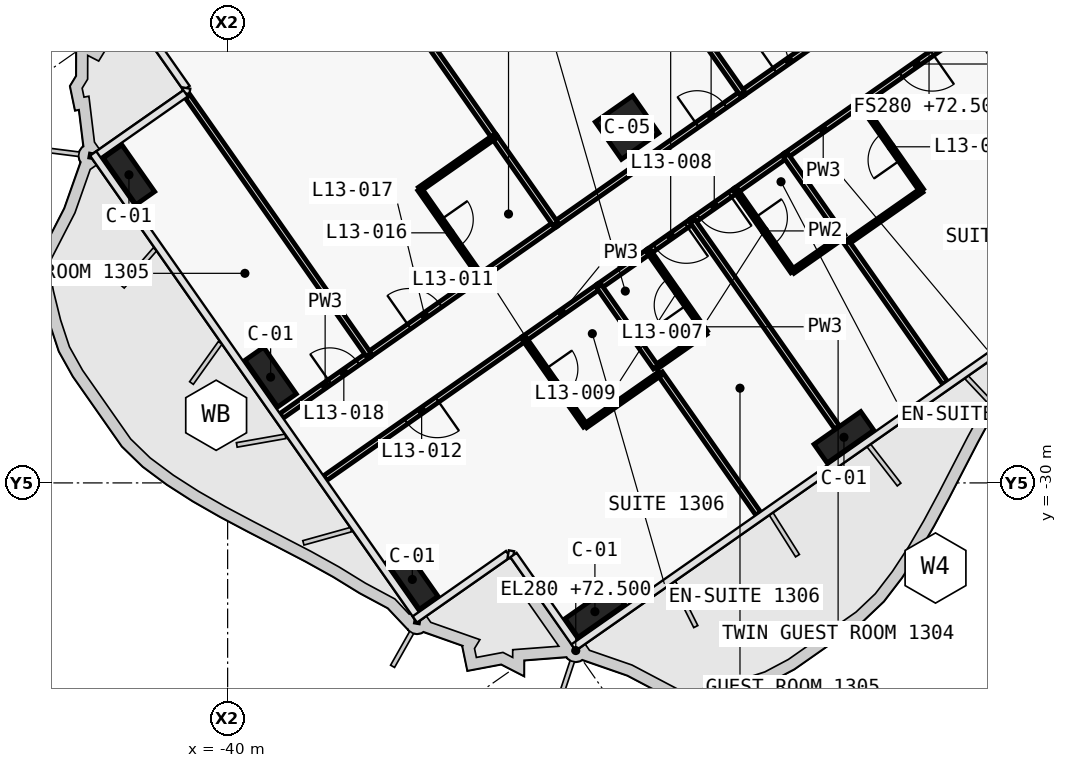
"""IFC4 building model, lengths in metres.
Left out: names, types, materials, properties, quantities, classifications, styles, units other than length and angle.
Written with IfcOpenShell. Run it as: python <this file> out.ifc"""

import sys

from ifc_helpers import new_model, si_unit, direction, frame, frame_2d, origin, origin_2d, place, context, subcontext, project, spatial, rectangle, extrude, element, fill, save


model = new_model("IFC4")
c1 = context("Model", 3, precision=1e-05, world=origin(), true_north=direction((0.0, 1.0)))
c2 = subcontext(c1, "Body", "Model", "MODEL_VIEW")
j1 = project(units=[si_unit("LENGTHUNIT", "METRE"), si_unit("PLANEANGLEUNIT", "RADIAN")], contexts=[c1])
p1 = place(None, origin())
s1 = spatial("IfcSite", under=j1, at=p1, CompositionType="ELEMENT")
p2 = place(p1, origin())
s2 = spatial("IfcBuilding", under=s1, at=p2, CompositionType="ELEMENT")
p3 = place(p2, frame((0.0, 0.0, 72.5)))
s3 = spatial("IfcBuildingStorey", under=s2, at=p3, CompositionType="ELEMENT", Elevation=72.5)
for number, where, z_axis, x_axis in (
    (1, (-23.782, -28.799, 0.0), (0.0, 0.0, 1.0), (-0.819, -0.574, 0.0)),
    (2, (-30.336, -33.388, 0.0), (0.0, 0.0, 1.0), (-0.819, -0.574, 0.0)),
    (3, (-35.14, -32.541, 0.0), (0.0, 0.0, 1.0), (-0.574, 0.819, 0.0)),
    (4, (-38.869, -27.216, 0.0), (0.0, 0.0, 1.0), (-0.574, 0.819, 0.0)),
    (5, (-42.597, -21.892, 0.0), (0.0, 0.0, 1.0), (-0.574, 0.819, 0.0)),
):
    element("IfcColumn", number, at=place(p3, frame(where, z_axis=z_axis, x_axis=x_axis)), inside=s3, PredefinedType="COLUMN", context=c2, shape_type="SweptSolid", body=[
        extrude(rectangle(XDim=1.5, YDim=0.6, at=origin_2d()), origin(), (0.0, 0.0, 1.0), 3.6),
    ])
p4 = place(p3, frame((-29.49, -20.649, 0.0), z_axis=(0.0, 0.0, 1.0), x_axis=(-0.819152044289, -0.573576436351, 0.0)))
e6 = element("IfcColumn", 6, at=p4, inside=s3, PredefinedType="COLUMN", context=c2, shape_type="SweptSolid", body=[
    extrude(rectangle(XDim=1.2, YDim=1.2, at=origin_2d()), origin(), (0.0, 0.0, 1.0), 3.6),
])
p5 = place(p3, frame((-26.46, -19.748, 0.0), z_axis=(0.0, 0.0, 1.0), x_axis=(0.819193738533, 0.573516886193, 0.0)))
e7 = element("IfcWall", 7, at=p5, inside=s3, PredefinedType="PARTITIONING", context=c2, shape_type="SweptSolid", body=[
    extrude(rectangle(XDim=3.004, YDim=0.15, at=frame_2d((1.502, 0.0))), origin(), (0.0, 0.0, 1.0), 3.32),
])
p6 = place(p5, frame((1.052, 0.0, 0.0)))
e8 = element("IfcOpeningElement", 8, at=p6, cuts=e7, PredefinedType="OPENING", context=c2, shape_type="SweptSolid", body=[
    extrude(rectangle(XDim=0.9, YDim=2.1, at=frame_2d((0.45, 1.05))), frame((0.0, 0.085, 0.0), z_axis=(0.0, -1.0, 0.0), x_axis=(1.0, 0.0, 0.0)), (0.0, 0.0, 1.0), 0.17),
])
p7 = place(p3, frame((-31.375, -23.19, 0.0), z_axis=(0.0, 0.0, 1.0), x_axis=(0.819165052243, 0.573557858619, 0.0)))
e9 = element("IfcWall", 9, at=p7, inside=s3, PredefinedType="PARTITIONING", context=c2, shape_type="SweptSolid", body=[
    extrude(rectangle(XDim=6.004, YDim=0.15, at=frame_2d((3.002, 0.0))), origin(), (0.0, 0.0, 1.0), 2.6),
])
p8 = place(p7, frame((4.552, 0.0, 0.0)))
e10 = element("IfcOpeningElement", 10, at=p8, cuts=e9, PredefinedType="OPENING", context=c2, shape_type="SweptSolid", body=[
    extrude(rectangle(XDim=0.9, YDim=2.1, at=frame_2d((0.45, 1.05))), frame((0.0, 0.085, 0.0), z_axis=(0.0, -1.0, 0.0), x_axis=(1.0, 0.0, 0.0)), (0.0, 0.0, 1.0), 0.17),
])
p9 = place(p3, frame((-36.29, -26.631, 0.0), z_axis=(0.0, 0.0, 1.0), x_axis=(0.81917779803, 0.57353965444, 0.0)))
e11 = element("IfcWall", 11, at=p9, inside=s3, PredefinedType="PARTITIONING", context=c2, shape_type="SweptSolid", body=[
    extrude(rectangle(XDim=3.603, YDim=0.15, at=frame_2d((1.801, 0.0))), origin(), (0.0, 0.0, 1.0), 3.32),
])
p10 = place(p9, frame((1.302, 0.0, 0.0)))
e12 = element("IfcOpeningElement", 12, at=p10, cuts=e11, PredefinedType="OPENING", context=c2, shape_type="SweptSolid", body=[
    extrude(rectangle(XDim=1.0, YDim=2.1, at=frame_2d((0.5, 1.05))), frame((0.0, 0.085, 0.0), z_axis=(0.0, -1.0, 0.0), x_axis=(1.0, 0.0, 0.0)), (0.0, 0.0, 1.0), 0.17),
])
p11 = place(p3, frame((-33.341, -24.566, 0.0), z_axis=(0.0, 0.0, 1.0), x_axis=(0.819179439794, 0.573537309527, 0.0)))
e13 = element("IfcWall", 13, at=p11, inside=s3, PredefinedType="PARTITIONING", context=c2, shape_type="SweptSolid", body=[
    extrude(rectangle(XDim=2.404, YDim=0.15, at=frame_2d((1.202, 0.0))), origin(), (0.0, 0.0, 1.0), 3.32),
])
p12 = place(p3, frame((-38.582, -28.236, 0.0), z_axis=(0.0, 0.0, 1.0), x_axis=(0.819137759006, 0.573596837309, 0.0)))
e14 = element("IfcWall", 14, at=p12, inside=s3, PredefinedType="PARTITIONING", context=c2, shape_type="SweptSolid", body=[
    extrude(rectangle(XDim=2.802, YDim=0.15, at=frame_2d((1.401, 0.0))), origin(), (0.0, 0.0, 1.0), 2.5),
])
p13 = place(p12, frame((1.551, 0.0, 0.0)))
e15 = element("IfcOpeningElement", 15, at=p13, cuts=e14, PredefinedType="OPENING", context=c2, shape_type="SweptSolid", body=[
    extrude(rectangle(XDim=0.9, YDim=2.1, at=frame_2d((0.45, 1.05))), frame((0.0, 0.085, 0.0), z_axis=(0.0, -1.0, 0.0), x_axis=(1.0, 0.0, 0.0)), (0.0, 0.0, 1.0), 0.17),
])
p14 = place(p3, frame((-20.395, -17.943, 0.0), z_axis=(0.0, 0.0, 1.0), x_axis=(-0.819145961204, -0.573585123798, 0.0)))
e16 = element("IfcWall", 16, at=p14, inside=s3, PredefinedType="PARTITIONING", context=c2, shape_type="SweptSolid", body=[
    extrude(rectangle(XDim=3.603, YDim=0.15, at=frame_2d((1.802, 0.0))), origin(), (0.0, 0.0, 1.0), 2.6),
])
p15 = place(p14, frame((1.302, 0.0, 0.0)))
e17 = element("IfcOpeningElement", 17, at=p15, cuts=e16, PredefinedType="OPENING", context=c2, shape_type="SweptSolid", body=[
    extrude(rectangle(XDim=1.0, YDim=2.1, at=frame_2d((0.5, 1.05))), frame((0.0, 0.085, 0.0), z_axis=(0.0, -1.0, 0.0), x_axis=(1.0, 0.0, 0.0)), (0.0, 0.0, 1.0), 0.17),
])
p16 = place(p3, frame((-23.344, -20.008, 0.0), z_axis=(0.0, 0.0, 1.0), x_axis=(-0.819146032251, -0.573585022335, 0.0)))
e18 = element("IfcWall", 18, at=p16, inside=s3, PredefinedType="PARTITIONING", context=c2, shape_type="SweptSolid", body=[
    extrude(rectangle(XDim=2.404, YDim=0.15, at=frame_2d((1.202, 0.0))), origin(), (0.0, 0.0, 1.0), 3.32),
])
p17 = place(p3, frame((-26.621, -22.302, 0.0), z_axis=(0.0, 0.0, 1.0), x_axis=(-0.819117471667, -0.573625808005, 0.0)))
e19 = element("IfcWall", 19, at=p17, inside=s3, PredefinedType="PARTITIONING", context=c2, shape_type="SweptSolid", body=[
    extrude(rectangle(XDim=1.403, YDim=0.15, at=frame_2d((0.702, 0.0))), origin(), (0.0, 0.0, 1.0), 2.6),
])
p18 = place(p17, frame((0.201, 0.0, 0.0)))
e20 = element("IfcOpeningElement", 20, at=p18, cuts=e19, PredefinedType="OPENING", context=c2, shape_type="SweptSolid", body=[
    extrude(rectangle(XDim=1.0, YDim=2.1, at=frame_2d((0.5, 1.05))), frame((0.0, 0.085, 0.0), z_axis=(0.0, -1.0, 0.0), x_axis=(1.0, 0.0, 0.0)), (0.0, 0.0, 1.0), 0.17),
])
p19 = place(p3, frame((-25.31, -21.384, 0.0), z_axis=(0.0, 0.0, 1.0), x_axis=(-0.819189013667, -0.573523634986, 0.0)))
e21 = element("IfcWall", 21, at=p19, inside=s3, PredefinedType="PARTITIONING", context=c2, shape_type="SweptSolid", body=[
    extrude(rectangle(XDim=1.604, YDim=0.15, at=frame_2d((0.802, 0.0))), origin(), (0.0, 0.0, 1.0), 3.32),
])
p20 = place(p3, frame((-27.767, -23.105, 0.0), z_axis=(0.0, 0.0, 1.0), x_axis=(-0.819117471667, -0.573625808005, 0.0)))
e22 = element("IfcWall", 22, at=p20, inside=s3, PredefinedType="PARTITIONING", context=c2, shape_type="SweptSolid", body=[
    extrude(rectangle(XDim=1.403, YDim=0.15, at=frame_2d((0.702, 0.0))), origin(), (0.0, 0.0, 1.0), 2.6),
])
p21 = place(p20, frame((0.202, 0.0, 0.0)))
e23 = element("IfcOpeningElement", 23, at=p21, cuts=e22, PredefinedType="OPENING", context=c2, shape_type="SweptSolid", body=[
    extrude(rectangle(XDim=1.0, YDim=2.1, at=frame_2d((0.5, 1.05))), frame((0.0, 0.085, 0.0), z_axis=(0.0, -1.0, 0.0), x_axis=(1.0, 0.0, 0.0)), (0.0, 0.0, 1.0), 0.17),
])
p22 = place(p3, frame((-28.914, -23.908, 0.0), z_axis=(0.0, 0.0, 1.0), x_axis=(-0.819189013667, -0.573523634986, 0.0)))
e24 = element("IfcWall", 24, at=p22, inside=s3, PredefinedType="PARTITIONING", context=c2, shape_type="SweptSolid", body=[
    extrude(rectangle(XDim=1.604, YDim=0.15, at=frame_2d((0.802, 0.0))), origin(), (0.0, 0.0, 1.0), 3.32),
])
p23 = place(p3, frame((-32.191, -26.203, 0.0), z_axis=(0.0, 0.0, 1.0), x_axis=(-0.819140526837, -0.573592884626, 0.0)))
e25 = element("IfcWall", 25, at=p23, inside=s3, PredefinedType="PARTITIONING", context=c2, shape_type="SweptSolid", body=[
    extrude(rectangle(XDim=6.401, YDim=0.15, at=frame_2d((3.201, 0.0))), origin(), (0.0, 0.0, 1.0), 2.5),
])
p24 = place(p23, frame((2.801, 0.0, 0.0)))
e26 = element("IfcOpeningElement", 26, at=p24, cuts=e25, PredefinedType="OPENING", context=c2, shape_type="SweptSolid", body=[
    extrude(rectangle(XDim=1.0, YDim=2.1, at=frame_2d((0.5, 1.05))), frame((0.0, 0.085, 0.0), z_axis=(0.0, -1.0, 0.0), x_axis=(1.0, 0.0, 0.0)), (0.0, 0.0, 1.0), 0.17),
])
p25 = place(p3, frame((-30.225, -24.826, 0.0), z_axis=(0.0, 0.0, 1.0), x_axis=(-0.819146032251, -0.573585022335, 0.0)))
e27 = element("IfcWall", 27, at=p25, inside=s3, PredefinedType="PARTITIONING", context=c2, shape_type="SweptSolid", body=[
    extrude(rectangle(XDim=2.404, YDim=0.15, at=frame_2d((1.202, 0.0))), origin(), (0.0, 0.0, 1.0), 3.32),
])
p26 = place(p3, frame((-26.458, -19.747, 0.0), z_axis=(0.0, 0.0, 1.0), x_axis=(-0.573571089604, 0.819155788095, 0.0)))
e28 = element("IfcWall", 28, at=p26, inside=s3, PredefinedType="PARTITIONING", context=c2, shape_type="SweptSolid", body=[
    extrude(rectangle(XDim=11.3, YDim=0.15, at=frame_2d((5.65, 0.0))), origin(), (0.0, 0.0, 1.0), 2.6),
])
p27 = place(p3, frame((-32.979, -20.896, 0.0), z_axis=(0.0, 0.0, 1.0), x_axis=(-0.573576058406, 0.819152308929, 0.0)))
e29 = element("IfcWall", 29, at=p27, inside=s3, PredefinedType="PARTITIONING", context=c2, shape_type="SweptSolid", body=[
    extrude(rectangle(XDim=8.501, YDim=0.15, at=frame_2d((4.25, 0.0))), origin(), (0.0, 0.0, 1.0), 2.5),
])
p28 = place(p3, frame((-31.373, -23.189, 0.0), z_axis=(0.0, 0.0, 1.0), x_axis=(-0.573555899632, 0.819166423871, 0.0)))
e30 = element("IfcWall", 30, at=p28, inside=s3, PredefinedType="PARTITIONING", context=c2, shape_type="SweptSolid", body=[
    extrude(rectangle(XDim=2.802, YDim=0.15, at=frame_2d((1.401, 0.0))), origin(), (0.0, 0.0, 1.0), 2.6),
])
p29 = place(p3, frame((-32.98, -20.894, 0.0), z_axis=(0.0, 0.0, 1.0), x_axis=(-0.819155442668, -0.573571582932, 0.0)))
e31 = element("IfcWall", 31, at=p29, inside=s3, PredefinedType="PARTITIONING", context=c2, shape_type="SweptSolid", body=[
    extrude(rectangle(XDim=2.4, YDim=0.12, at=frame_2d((1.2, 0.0))), origin(), (0.0, 0.0, 1.0), 3.32),
])
p30 = place(p3, frame((-34.946, -22.272, 0.0), z_axis=(0.0, 0.0, 1.0), x_axis=(0.573608623498, -0.819129505664, 0.0)))
e32 = element("IfcWall", 32, at=p30, inside=s3, PredefinedType="PARTITIONING", context=c2, shape_type="SweptSolid", body=[
    extrude(rectangle(XDim=2.8, YDim=0.12, at=frame_2d((1.4, 0.0))), origin(), (0.0, 0.0, 1.0), 2.6),
])
p31 = place(p30, frame((0.975, 0.0, 0.0)))
e33 = element("IfcOpeningElement", 33, at=p31, cuts=e32, PredefinedType="OPENING", context=c2, shape_type="SweptSolid", body=[
    extrude(rectangle(XDim=0.85, YDim=2.05, at=frame_2d((0.425, 1.025))), frame((0.0, 0.07, 0.0), z_axis=(0.0, -1.0, 0.0), x_axis=(1.0, 0.0, 0.0)), (0.0, 0.0, 1.0), 0.14),
])
p32 = place(p3, frame((-36.288, -26.63, 0.0), z_axis=(0.0, 0.0, 1.0), x_axis=(-0.573555124968, 0.819166966267, 0.0)))
e34 = element("IfcWall", 34, at=p32, inside=s3, PredefinedType="PARTITIONING", context=c2, shape_type="SweptSolid", body=[
    extrude(rectangle(XDim=8.3, YDim=0.15, at=frame_2d((4.15, 0.0))), origin(), (0.0, 0.0, 1.0), 2.6),
])
p33 = place(p3, frame((-16.594, -23.375, 0.0), z_axis=(0.0, 0.0, 1.0), x_axis=(-0.57359826181, 0.819136761505, 0.0)))
e35 = element("IfcWall", 35, at=p33, inside=s3, PredefinedType="PARTITIONING", context=c2, shape_type="SweptSolid", body=[
    extrude(rectangle(XDim=6.63, YDim=0.15, at=frame_2d((3.315, 0.0))), origin(), (0.0, 0.0, 1.0), 2.6),
])
p34 = place(p3, frame((-23.705, -23.68, 0.0), z_axis=(0.0, 0.0, 1.0), x_axis=(0.819107643868, 0.573639841501, 0.0)))
e36 = element("IfcWall", 36, at=p34, inside=s3, PredefinedType="PARTITIONING", context=c2, shape_type="SweptSolid", body=[
    extrude(rectangle(XDim=2.4, YDim=0.12, at=frame_2d((1.2, 0.0))), origin(), (0.0, 0.0, 1.0), 3.32),
])
p35 = place(p3, frame((-21.739, -22.302, 0.0), z_axis=(0.0, 0.0, 1.0), x_axis=(-0.573550118428, 0.819170471667, 0.0)))
e37 = element("IfcWall", 37, at=p35, inside=s3, PredefinedType="PARTITIONING", context=c2, shape_type="SweptSolid", body=[
    extrude(rectangle(XDim=2.8, YDim=0.12, at=frame_2d((1.4, 0.0))), origin(), (0.0, 0.0, 1.0), 3.32),
])
p36 = place(p35, frame((0.975, 0.0, 0.0)))
e38 = element("IfcOpeningElement", 38, at=p36, cuts=e37, PredefinedType="OPENING", context=c2, shape_type="SweptSolid", body=[
    extrude(rectangle(XDim=0.85, YDim=2.05, at=frame_2d((0.425, 1.025))), frame((0.0, 0.07, 0.0), z_axis=(0.0, -1.0, 0.0), x_axis=(1.0, 0.0, 0.0)), (0.0, 0.0, 1.0), 0.14),
])
p37 = place(p3, frame((-21.124, -27.365, 0.0), z_axis=(0.0, 0.0, 1.0), x_axis=(-0.573553393703, 0.819168178442, 0.0)))
e39 = element("IfcWall", 39, at=p37, inside=s3, PredefinedType="PARTITIONING", context=c2, shape_type="SweptSolid", body=[
    extrude(rectangle(XDim=4.499, YDim=0.15, at=frame_2d((2.25, 0.0))), origin(), (0.0, 0.0, 1.0), 2.5),
])
p38 = place(p3, frame((-23.819, -23.517, 0.0), z_axis=(0.0, 0.0, 1.0), x_axis=(-0.573588285102, 0.819143747577, 0.0)))
e40 = element("IfcWall", 40, at=p38, inside=s3, PredefinedType="PARTITIONING", context=c2, shape_type="SweptSolid", body=[
    extrude(rectangle(XDim=2.602, YDim=0.15, at=frame_2d((1.301, 0.0))), origin(), (0.0, 0.0, 1.0), 3.32),
])
p39 = place(p3, frame((-26.623, -22.304, 0.0), z_axis=(0.0, 0.0, 1.0), x_axis=(0.573537965655, -0.819178980414, 0.0)))
e41 = element("IfcWall", 41, at=p39, inside=s3, PredefinedType="PARTITIONING", context=c2, shape_type="SweptSolid", body=[
    extrude(rectangle(XDim=2.6, YDim=0.12, at=frame_2d((1.3, 0.0))), origin(), (0.0, 0.0, 1.0), 3.32),
])
p40 = place(p39, frame((0.875, 0.0, 0.0)))
e42 = element("IfcOpeningElement", 42, at=p40, cuts=e41, PredefinedType="OPENING", context=c2, shape_type="SweptSolid", body=[
    extrude(rectangle(XDim=0.85, YDim=2.05, at=frame_2d((0.425, 1.025))), frame((0.0, 0.07, 0.0), z_axis=(0.0, -1.0, 0.0), x_axis=(1.0, 0.0, 0.0)), (0.0, 0.0, 1.0), 0.14),
])
p41 = place(p3, frame((-25.13, -24.434, 0.0), z_axis=(0.0, 0.0, 1.0), x_axis=(0.81918174131, 0.573534022273, 0.0)))
e43 = element("IfcWall", 43, at=p41, inside=s3, PredefinedType="PARTITIONING", context=c2, shape_type="SweptSolid", body=[
    extrude(rectangle(XDim=1.6, YDim=0.12, at=frame_2d((0.8, 0.0))), origin(), (0.0, 0.0, 1.0), 3.32),
])
p42 = place(p3, frame((-23.966, -28.537, 0.0), z_axis=(0.0, 0.0, 1.0), x_axis=(-0.57359826181, 0.819136761505, 0.0)))
e44 = element("IfcWall", 44, at=p42, inside=s3, PredefinedType="PARTITIONING", context=c2, shape_type="SweptSolid", body=[
    extrude(rectangle(XDim=6.63, YDim=0.15, at=frame_2d((3.315, 0.0))), origin(), (0.0, 0.0, 1.0), 2.6),
])
p43 = place(p3, frame((-28.734, -26.958, 0.0), z_axis=(0.0, 0.0, 1.0), x_axis=(0.81918174131, 0.573534022273, 0.0)))
e45 = element("IfcWall", 45, at=p43, inside=s3, PredefinedType="PARTITIONING", context=c2, shape_type="SweptSolid", body=[
    extrude(rectangle(XDim=1.6, YDim=0.12, at=frame_2d((0.8, 0.0))), origin(), (0.0, 0.0, 1.0), 3.32),
])
p44 = place(p3, frame((-27.423, -26.038, 0.0), z_axis=(0.0, 0.0, 1.0), x_axis=(-0.573645091666, 0.819103967032, 0.0)))
e46 = element("IfcWall", 46, at=p44, inside=s3, PredefinedType="PARTITIONING", context=c2, shape_type="SweptSolid", body=[
    extrude(rectangle(XDim=2.6, YDim=0.12, at=frame_2d((1.3, 0.0))), origin(), (0.0, 0.0, 1.0), 3.32),
])
p45 = place(p44, frame((0.875, 0.0, 0.0)))
e47 = element("IfcOpeningElement", 47, at=p45, cuts=e46, PredefinedType="OPENING", context=c2, shape_type="SweptSolid", body=[
    extrude(rectangle(XDim=0.85, YDim=2.05, at=frame_2d((0.425, 1.025))), frame((0.0, 0.07, 0.0), z_axis=(0.0, -1.0, 0.0), x_axis=(1.0, 0.0, 0.0)), (0.0, 0.0, 1.0), 0.14),
])
p46 = place(p3, frame((-26.039, -30.807, 0.0), z_axis=(0.0, 0.0, 1.0), x_axis=(-0.573593387921, 0.81914017441, 0.0)))
e48 = element("IfcWall", 48, at=p46, inside=s3, PredefinedType="PARTITIONING", context=c2, shape_type="SweptSolid", body=[
    extrude(rectangle(XDim=4.501, YDim=0.15, at=frame_2d((2.25, 0.0))), origin(), (0.0, 0.0, 1.0), 2.5),
])
p47 = place(p3, frame((-28.735, -26.957, 0.0), z_axis=(0.0, 0.0, 1.0), x_axis=(-0.573600972199, 0.819134863556, 0.0)))
e49 = element("IfcWall", 49, at=p47, inside=s3, PredefinedType="PARTITIONING", context=c2, shape_type="SweptSolid", body=[
    extrude(rectangle(XDim=2.6, YDim=0.15, at=frame_2d((1.3, 0.0))), origin(), (0.0, 0.0, 1.0), 3.32),
])
p48 = place(p3, frame((-32.193, -26.204, 0.0), z_axis=(0.0, 0.0, 1.0), x_axis=(0.573608623498, -0.819129505664, 0.0)))
e50 = element("IfcWall", 50, at=p48, inside=s3, PredefinedType="PARTITIONING", context=c2, shape_type="SweptSolid", body=[
    extrude(rectangle(XDim=2.8, YDim=0.12, at=frame_2d((1.4, 0.0))), origin(), (0.0, 0.0, 1.0), 3.32),
])
p49 = place(p48, frame((0.975, 0.0, 0.0)))
e51 = element("IfcOpeningElement", 51, at=p49, cuts=e50, PredefinedType="OPENING", context=c2, shape_type="SweptSolid", body=[
    extrude(rectangle(XDim=0.85, YDim=2.05, at=frame_2d((0.425, 1.025))), frame((0.0, 0.07, 0.0), z_axis=(0.0, -1.0, 0.0), x_axis=(1.0, 0.0, 0.0)), (0.0, 0.0, 1.0), 0.14),
])
p50 = place(p3, frame((-30.586, -28.498, 0.0), z_axis=(0.0, 0.0, 1.0), x_axis=(0.819141114317, 0.573592045652, 0.0)))
e52 = element("IfcWall", 52, at=p50, inside=s3, PredefinedType="PARTITIONING", context=c2, shape_type="SweptSolid", body=[
    extrude(rectangle(XDim=2.4, YDim=0.12, at=frame_2d((1.2, 0.0))), origin(), (0.0, 0.0, 1.0), 3.32),
])
p51 = place(p36, origin())
e53 = element("IfcDoor", 53, at=p51, inside=s3, OperationType="SINGLE_SWING_LEFT", PredefinedType="DOOR", context=c2, shape_type="SweptSolid", body=[
    extrude(rectangle(XDim=0.85, YDim=2.05, at=frame_2d((0.425, 1.025))), frame((0.0, 0.025, 0.0), z_axis=(0.0, -1.0, 0.0), x_axis=(1.0, 0.0, 0.0)), (0.0, 0.0, 1.0), 0.05),
])
fill(e38, e53)
p52 = place(p15, origin())
e54 = element("IfcDoor", 54, at=p52, inside=s3, OperationType="SINGLE_SWING_RIGHT", PredefinedType="DOOR", context=c2, shape_type="SweptSolid", body=[
    extrude(rectangle(XDim=1.0, YDim=2.1, at=frame_2d((0.5, 1.05))), frame((0.0, 0.025, 0.0), z_axis=(0.0, -1.0, 0.0), x_axis=(1.0, 0.0, 0.0)), (0.0, 0.0, 1.0), 0.05),
])
fill(e17, e54)
p53 = place(p40, origin())
e55 = element("IfcDoor", 55, at=p53, inside=s3, OperationType="SINGLE_SWING_RIGHT", PredefinedType="DOOR", context=c2, shape_type="SweptSolid", body=[
    extrude(rectangle(XDim=0.85, YDim=2.05, at=frame_2d((0.425, 1.025))), frame((0.0, 0.025, 0.0), z_axis=(0.0, -1.0, 0.0), x_axis=(1.0, 0.0, 0.0)), (0.0, 0.0, 1.0), 0.05),
])
fill(e42, e55)
p54 = place(p18, origin())
e56 = element("IfcDoor", 56, at=p54, inside=s3, OperationType="SINGLE_SWING_LEFT", PredefinedType="DOOR", context=c2, shape_type="SweptSolid", body=[
    extrude(rectangle(XDim=1.0, YDim=2.1, at=frame_2d((0.5, 1.05))), frame((0.0, 0.025, 0.0), z_axis=(0.0, -1.0, 0.0), x_axis=(1.0, 0.0, 0.0)), (0.0, 0.0, 1.0), 0.05),
])
fill(e20, e56)
p55 = place(p45, origin())
e57 = element("IfcDoor", 57, at=p55, inside=s3, OperationType="SINGLE_SWING_RIGHT", PredefinedType="DOOR", context=c2, shape_type="SweptSolid", body=[
    extrude(rectangle(XDim=0.85, YDim=2.05, at=frame_2d((0.425, 1.025))), frame((0.0, 0.025, 0.0), z_axis=(0.0, -1.0, 0.0), x_axis=(1.0, 0.0, 0.0)), (0.0, 0.0, 1.0), 0.05),
])
fill(e47, e57)
p56 = place(p21, origin())
e58 = element("IfcDoor", 58, at=p56, inside=s3, OperationType="SINGLE_SWING_LEFT", PredefinedType="DOOR", context=c2, shape_type="SweptSolid", body=[
    extrude(rectangle(XDim=1.0, YDim=2.1, at=frame_2d((0.5, 1.05))), frame((0.0, 0.025, 0.0), z_axis=(0.0, -1.0, 0.0), x_axis=(1.0, 0.0, 0.0)), (0.0, 0.0, 1.0), 0.05),
])
fill(e23, e58)
p57 = place(p49, origin())
e59 = element("IfcDoor", 59, at=p57, inside=s3, OperationType="SINGLE_SWING_LEFT", PredefinedType="DOOR", context=c2, shape_type="SweptSolid", body=[
    extrude(rectangle(XDim=0.85, YDim=2.05, at=frame_2d((0.425, 1.025))), frame((0.0, 0.025, 0.0), z_axis=(0.0, -1.0, 0.0), x_axis=(1.0, 0.0, 0.0)), (0.0, 0.0, 1.0), 0.05),
])
fill(e51, e59)
p58 = place(p24, origin())
e60 = element("IfcDoor", 60, at=p58, inside=s3, OperationType="SINGLE_SWING_LEFT", PredefinedType="DOOR", context=c2, shape_type="SweptSolid", body=[
    extrude(rectangle(XDim=1.0, YDim=2.1, at=frame_2d((0.5, 1.05))), frame((0.0, 0.025, 0.0), z_axis=(0.0, -1.0, 0.0), x_axis=(1.0, 0.0, 0.0)), (0.0, 0.0, 1.0), 0.05),
])
fill(e26, e60)
p59 = place(p6, origin())
e61 = element("IfcDoor", 61, at=p59, inside=s3, OperationType="SINGLE_SWING_LEFT", PredefinedType="DOOR", context=c2, shape_type="SweptSolid", body=[
    extrude(rectangle(XDim=0.9, YDim=2.1, at=frame_2d((0.45, 1.05))), frame((0.0, 0.025, 0.0), z_axis=(0.0, -1.0, 0.0), x_axis=(1.0, 0.0, 0.0)), (0.0, 0.0, 1.0), 0.05),
])
fill(e8, e61)
p60 = place(p8, origin())
e62 = element("IfcDoor", 62, at=p60, inside=s3, OperationType="SINGLE_SWING_LEFT", PredefinedType="DOOR", context=c2, shape_type="SweptSolid", body=[
    extrude(rectangle(XDim=0.9, YDim=2.1, at=frame_2d((0.45, 1.05))), frame((0.0, 0.025, 0.0), z_axis=(0.0, -1.0, 0.0), x_axis=(1.0, 0.0, 0.0)), (0.0, 0.0, 1.0), 0.05),
])
fill(e10, e62)
p61 = place(p31, origin())
e63 = element("IfcDoor", 63, at=p61, inside=s3, OperationType="SINGLE_SWING_RIGHT", PredefinedType="DOOR", context=c2, shape_type="SweptSolid", body=[
    extrude(rectangle(XDim=0.85, YDim=2.05, at=frame_2d((0.425, 1.025))), frame((0.0, 0.025, 0.0), z_axis=(0.0, -1.0, 0.0), x_axis=(1.0, 0.0, 0.0)), (0.0, 0.0, 1.0), 0.05),
])
fill(e33, e63)
p62 = place(p10, origin())
e64 = element("IfcDoor", 64, at=p62, inside=s3, OperationType="SINGLE_SWING_LEFT", PredefinedType="DOOR", context=c2, shape_type="SweptSolid", body=[
    extrude(rectangle(XDim=1.0, YDim=2.1, at=frame_2d((0.5, 1.05))), frame((0.0, 0.025, 0.0), z_axis=(0.0, -1.0, 0.0), x_axis=(1.0, 0.0, 0.0)), (0.0, 0.0, 1.0), 0.05),
])
fill(e12, e64)
p63 = place(p13, origin())
e65 = element("IfcDoor", 65, at=p63, inside=s3, OperationType="SINGLE_SWING_RIGHT", PredefinedType="DOOR", context=c2, shape_type="SweptSolid", body=[
    extrude(rectangle(XDim=0.9, YDim=2.1, at=frame_2d((0.45, 1.05))), frame((0.0, 0.025, 0.0), z_axis=(0.0, -1.0, 0.0), x_axis=(1.0, 0.0, 0.0)), (0.0, 0.0, 1.0), 0.05),
])
fill(e15, e65)
save(model, sys.argv[1])
